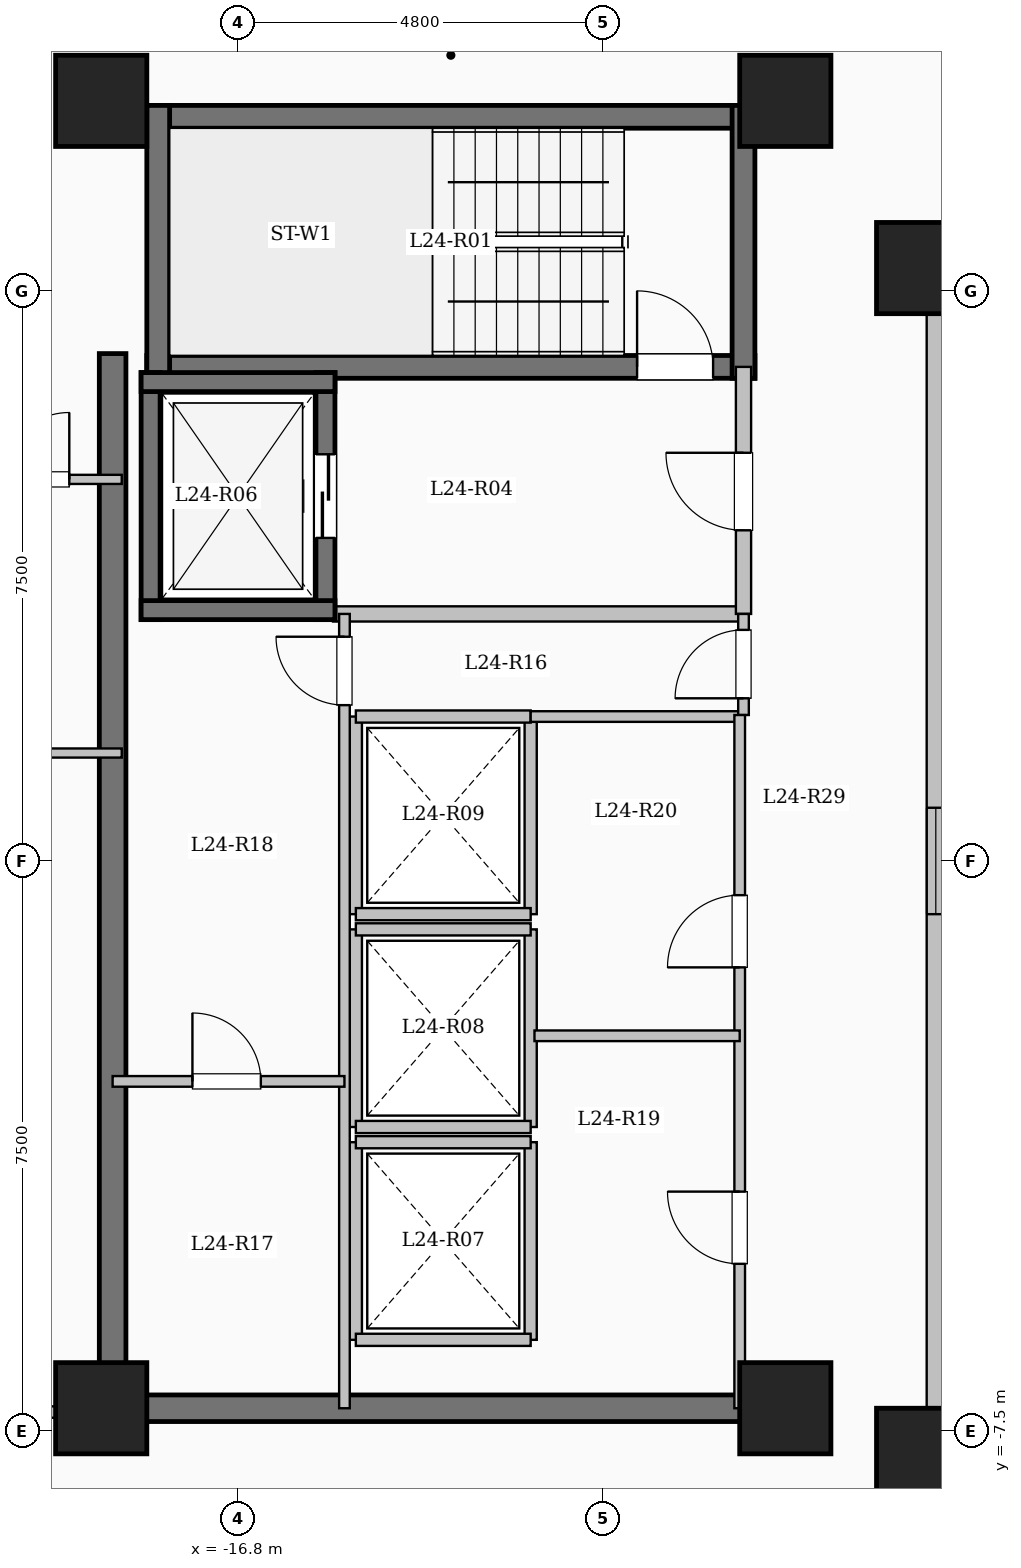
"""IFC4 building model, lengths in metres.
Left out: names, types, materials, properties, quantities, classifications, styles, units other than length and angle.
Written with IfcOpenShell. Run it as: python <this file> out.ifc"""

import sys

from ifc_helpers import new_model, si_unit, direction, frame, frame_2d, origin, origin_2d, place, context, subcontext, project, spatial, rectangle, extrude, element, fill, save


model = new_model("IFC4")
c1 = context("Model", 3, precision=1e-05, world=origin(), true_north=direction((0.0, 1.0)))
c2 = subcontext(c1, "Body", "Model", "MODEL_VIEW")
j1 = project(units=[si_unit("LENGTHUNIT", "METRE"), si_unit("PLANEANGLEUNIT", "RADIAN")], contexts=[c1])
p1 = place(None, origin())
s1 = spatial("IfcSite", under=j1, at=p1, CompositionType="ELEMENT")
p2 = place(p1, origin())
s2 = spatial("IfcBuilding", under=s1, at=p2, CompositionType="ELEMENT")
p3 = place(p2, frame((0.0, 0.0, 91.7)))
s3 = spatial("IfcBuildingStorey", under=s2, at=p3, CompositionType="ELEMENT", Elevation=91.7)
for number, where, z_axis, x_axis in (
    (1, (-7.8, -7.8, 0.0), (0.0, 0.0, 1.0), (1.0, 0.0, 0.0)),
    (2, (-7.8, 7.8, 0.0), (0.0, 0.0, 1.0), (1.0, 0.0, 0.0)),
    (3, (-9.6, -7.2, 0.0), (0.0, 0.0, 1.0), (1.0, 0.0, 0.0)),
    (4, (-9.6, 10.0, 0.0), (0.0, 0.0, 1.0), (1.0, 0.0, 0.0)),
    (5, (-18.6, -7.2, 0.0), (0.0, 0.0, 1.0), (1.0, 0.0, 0.0)),
    (6, (-18.6, 10.0, 0.0), (0.0, 0.0, 1.0), (1.0, 0.0, 0.0)),
):
    element("IfcColumn", number, at=place(p3, frame(where, z_axis=z_axis, x_axis=x_axis)), inside=s3, PredefinedType="COLUMN", context=c2, shape_type="SweptSolid", body=[
        extrude(rectangle(XDim=1.2, YDim=1.2, at=origin_2d()), origin(), (0.0, 0.0, 1.0), 3.35),
    ])
p4 = place(p3, frame((-7.62, -7.62, 0.0), z_axis=(0.0, 0.0, 1.0), x_axis=(1.0, 0.0, 0.0)))
e7 = element("IfcWall", 7, at=p4, inside=s3, PredefinedType="SOLIDWALL", context=c2, shape_type="SweptSolid", body=[
    extrude(rectangle(XDim=15.24, YDim=0.24, at=frame_2d((7.62, 0.0))), origin(), (0.0, 0.0, 1.0), 3.1),
])
p5 = place(p4, frame((6.92, 0.0, 0.95)))
e8 = element("IfcOpeningElement", 8, at=p5, cuts=e7, PredefinedType="OPENING", context=c2, shape_type="SweptSolid", body=[
    extrude(rectangle(XDim=1.4, YDim=1.5, at=frame_2d((0.7, 0.75))), frame((0.0, 0.13, 0.0), z_axis=(0.0, -1.0, 0.0), x_axis=(1.0, 0.0, 0.0)), (0.0, 0.0, 1.0), 0.26),
])
p6 = place(p3, frame((7.62, 7.62, 0.0), z_axis=(0.0, 0.0, 1.0), x_axis=(-1.0, 0.0, 0.0)))
e9 = element("IfcWall", 9, at=p6, inside=s3, PredefinedType="SOLIDWALL", context=c2, shape_type="SweptSolid", body=[
    extrude(rectangle(XDim=15.24, YDim=0.24, at=frame_2d((7.62, 0.0))), origin(), (0.0, 0.0, 1.0), 3.1),
])
p7 = place(p6, frame((6.92, 0.0, 0.95)))
e10 = element("IfcOpeningElement", 10, at=p7, cuts=e9, PredefinedType="OPENING", context=c2, shape_type="SweptSolid", body=[
    extrude(rectangle(XDim=1.4, YDim=1.5, at=frame_2d((0.7, 0.75))), frame((0.0, 0.13, 0.0), z_axis=(0.0, -1.0, 0.0), x_axis=(1.0, 0.0, 0.0)), (0.0, 0.0, 1.0), 0.26),
])
p8 = place(p3, frame((-7.62, 7.62, 0.0), z_axis=(0.0, 0.0, 1.0), x_axis=(0.0, -1.0, 0.0)))
e11 = element("IfcWall", 11, at=p8, inside=s3, PredefinedType="SOLIDWALL", context=c2, shape_type="SweptSolid", body=[
    extrude(rectangle(XDim=15.24, YDim=0.24, at=frame_2d((7.62, 0.0))), origin(), (0.0, 0.0, 1.0), 3.1),
])
p9 = place(p8, frame((6.92, 0.0, 0.95)))
e12 = element("IfcOpeningElement", 12, at=p9, cuts=e11, PredefinedType="OPENING", context=c2, shape_type="SweptSolid", body=[
    extrude(rectangle(XDim=1.4, YDim=1.5, at=frame_2d((0.7, 0.75))), frame((0.0, 0.13, 0.0), z_axis=(0.0, -1.0, 0.0), x_axis=(1.0, 0.0, 0.0)), (0.0, 0.0, 1.0), 0.26),
])
p10 = place(p3, frame((-18.0, 9.79, 0.0), z_axis=(0.0, 0.0, 1.0), x_axis=(1.0, 0.0, 0.0)))
e13 = element("IfcWall", 13, at=p10, inside=s3, PredefinedType="SHEAR", context=c2, shape_type="SweptSolid", body=[
    extrude(rectangle(XDim=8.0, YDim=0.3, at=frame_2d((4.0, 0.0))), origin(), (0.0, 0.0, 1.0), 3.35),
])
p11 = place(p3, frame((-18.0, 6.5, 0.0), z_axis=(0.0, 0.0, 1.0), x_axis=(1.0, 0.0, 0.0)))
e14 = element("IfcWall", 14, at=p11, inside=s3, PredefinedType="SHEAR", context=c2, shape_type="SweptSolid", body=[
    extrude(rectangle(XDim=8.0, YDim=0.3, at=frame_2d((4.0, 0.0))), origin(), (0.0, 0.0, 1.0), 3.35),
])
p12 = place(p11, frame((6.45, 0.0, 0.0)))
e15 = element("IfcOpeningElement", 15, at=p12, cuts=e14, PredefinedType="OPENING", context=c2, shape_type="SweptSolid", body=[
    extrude(rectangle(XDim=1.0, YDim=2.15, at=frame_2d((0.5, 1.075))), frame((0.0, 0.16, 0.0), z_axis=(0.0, -1.0, 0.0), x_axis=(1.0, 0.0, 0.0)), (0.0, 0.0, 1.0), 0.32),
])
for number, where, z_axis, x_axis in (
    (16, (-17.85, 6.35, 0.0), (0.0, 0.0, 1.0), (0.0, 1.0, 0.0)),
    (17, (-10.15, 6.35, 0.0), (0.0, 0.0, 1.0), (0.0, 1.0, 0.0)),
):
    element("IfcWall", number, at=place(p3, frame(where, z_axis=z_axis, x_axis=x_axis)), inside=s3, PredefinedType="SHEAR", context=c2, shape_type="SweptSolid", body=[
        extrude(rectangle(XDim=3.59, YDim=0.3, at=frame_2d((1.795, 0.0))), origin(), (0.0, 0.0, 1.0), 3.35),
    ])
p13 = place(p3, frame((-15.55, 3.25, 0.0), z_axis=(0.0, 0.0, 1.0), x_axis=(1.0, 0.0, 0.0)))
e18 = element("IfcWall", 18, at=p13, inside=s3, PredefinedType="SOLIDWALL", context=c2, shape_type="SweptSolid", body=[
    extrude(rectangle(XDim=5.4, YDim=0.2, at=frame_2d((2.7, 0.0))), origin(), (0.0, 0.0, 1.0), 3.1),
])
p14 = place(p3, frame((-10.15, 3.25, 0.0), z_axis=(0.0, 0.0, 1.0), x_axis=(0.0, 1.0, 0.0)))
e19 = element("IfcWall", 19, at=p14, inside=s3, PredefinedType="SOLIDWALL", context=c2, shape_type="SweptSolid", body=[
    extrude(rectangle(XDim=3.25, YDim=0.2, at=frame_2d((1.625, 0.0))), origin(), (0.0, 0.0, 1.0), 3.1),
])
p15 = place(p14, frame((1.1, 0.0, 0.0)))
e20 = element("IfcOpeningElement", 20, at=p15, cuts=e19, PredefinedType="OPENING", context=c2, shape_type="SweptSolid", body=[
    extrude(rectangle(XDim=1.02, YDim=2.15, at=frame_2d((0.51, 1.075))), frame((0.0, 0.11, 0.0), z_axis=(0.0, -1.0, 0.0), x_axis=(1.0, 0.0, 0.0)), (0.0, 0.0, 1.0), 0.22),
])
p16 = place(p3, frame((-17.95, 3.175, 0.0), z_axis=(0.0, 0.0, 1.0), x_axis=(0.0, 1.0, 0.0)))
e21 = element("IfcWall", 21, at=p16, inside=s3, PredefinedType="SHEAR", context=c2, shape_type="SweptSolid", body=[
    extrude(rectangle(XDim=3.25, YDim=0.25, at=frame_2d((1.625, 0.0))), origin(), (0.0, 0.0, 1.0), 3.35),
])
p17 = place(p3, frame((-15.65, 3.175, 0.0), z_axis=(0.0, 0.0, 1.0), x_axis=(0.0, 1.0, 0.0)))
e22 = element("IfcWall", 22, at=p17, inside=s3, PredefinedType="SHEAR", context=c2, shape_type="SweptSolid", body=[
    extrude(rectangle(XDim=3.25, YDim=0.25, at=frame_2d((1.625, 0.0))), origin(), (0.0, 0.0, 1.0), 3.35),
])
p18 = place(p17, frame((1.075, 0.0, 0.0)))
e23 = element("IfcOpeningElement", 23, at=p18, cuts=e22, PredefinedType="OPENING", context=c2, shape_type="SweptSolid", body=[
    extrude(rectangle(XDim=1.1, YDim=2.15, at=frame_2d((0.55, 1.075))), frame((0.0, 0.135, 0.0), z_axis=(0.0, -1.0, 0.0), x_axis=(1.0, 0.0, 0.0)), (0.0, 0.0, 1.0), 0.27),
])
for number, where, z_axis, x_axis in (
    (24, (-18.075, 3.3, 0.0), (0.0, 0.0, 1.0), (1.0, 0.0, 0.0)),
    (25, (-18.075, 6.3, 0.0), (0.0, 0.0, 1.0), (1.0, 0.0, 0.0)),
):
    element("IfcWall", number, at=place(p3, frame(where, z_axis=z_axis, x_axis=x_axis)), inside=s3, PredefinedType="SHEAR", context=c2, shape_type="SweptSolid", body=[
        extrude(rectangle(XDim=2.55, YDim=0.25, at=frame_2d((1.275, 0.0))), origin(), (0.0, 0.0, 1.0), 3.35),
    ])
for number, where, z_axis, x_axis in (
    (26, (-15.25, -6.3, 0.0), (0.0, 0.0, 1.0), (0.0, 1.0, 0.0)),
    (27, (-12.95, -6.3, 0.0), (0.0, 0.0, 1.0), (0.0, 1.0, 0.0)),
):
    element("IfcWall", number, at=place(p3, frame(where, z_axis=z_axis, x_axis=x_axis)), inside=s3, PredefinedType="SOLIDWALL", context=c2, shape_type="SweptSolid", body=[
        extrude(rectangle(XDim=2.6, YDim=0.16, at=frame_2d((1.3, 0.0))), origin(), (0.0, 0.0, 1.0), 3.1),
    ])
for number, where, z_axis, x_axis in (
    (28, (-15.25, -6.3, 0.0), (0.0, 0.0, 1.0), (1.0, 0.0, 0.0)),
    (29, (-15.25, -3.7, 0.0), (0.0, 0.0, 1.0), (1.0, 0.0, 0.0)),
):
    element("IfcWall", number, at=place(p3, frame(where, z_axis=z_axis, x_axis=x_axis)), inside=s3, PredefinedType="SOLIDWALL", context=c2, shape_type="SweptSolid", body=[
        extrude(rectangle(XDim=2.3, YDim=0.16, at=frame_2d((1.15, 0.0))), origin(), (0.0, 0.0, 1.0), 3.1),
    ])
for number, where, z_axis, x_axis in (
    (30, (-15.25, -3.5, 0.0), (0.0, 0.0, 1.0), (0.0, 1.0, 0.0)),
    (31, (-12.95, -3.5, 0.0), (0.0, 0.0, 1.0), (0.0, 1.0, 0.0)),
):
    element("IfcWall", number, at=place(p3, frame(where, z_axis=z_axis, x_axis=x_axis)), inside=s3, PredefinedType="SOLIDWALL", context=c2, shape_type="SweptSolid", body=[
        extrude(rectangle(XDim=2.6, YDim=0.16, at=frame_2d((1.3, 0.0))), origin(), (0.0, 0.0, 1.0), 3.1),
    ])
for number, where, z_axis, x_axis in (
    (32, (-15.25, -3.5, 0.0), (0.0, 0.0, 1.0), (1.0, 0.0, 0.0)),
    (33, (-15.25, -0.9, 0.0), (0.0, 0.0, 1.0), (1.0, 0.0, 0.0)),
):
    element("IfcWall", number, at=place(p3, frame(where, z_axis=z_axis, x_axis=x_axis)), inside=s3, PredefinedType="SOLIDWALL", context=c2, shape_type="SweptSolid", body=[
        extrude(rectangle(XDim=2.3, YDim=0.16, at=frame_2d((1.15, 0.0))), origin(), (0.0, 0.0, 1.0), 3.1),
    ])
for number, where, z_axis, x_axis in (
    (34, (-15.25, -0.7, 0.0), (0.0, 0.0, 1.0), (0.0, 1.0, 0.0)),
    (35, (-12.95, -0.7, 0.0), (0.0, 0.0, 1.0), (0.0, 1.0, 0.0)),
):
    element("IfcWall", number, at=place(p3, frame(where, z_axis=z_axis, x_axis=x_axis)), inside=s3, PredefinedType="SOLIDWALL", context=c2, shape_type="SweptSolid", body=[
        extrude(rectangle(XDim=2.6, YDim=0.16, at=frame_2d((1.3, 0.0))), origin(), (0.0, 0.0, 1.0), 3.1),
    ])
for number, where, z_axis, x_axis in (
    (36, (-15.25, -0.7, 0.0), (0.0, 0.0, 1.0), (1.0, 0.0, 0.0)),
    (37, (-15.25, 1.9, 0.0), (0.0, 0.0, 1.0), (1.0, 0.0, 0.0)),
):
    element("IfcWall", number, at=place(p3, frame(where, z_axis=z_axis, x_axis=x_axis)), inside=s3, PredefinedType="SOLIDWALL", context=c2, shape_type="SweptSolid", body=[
        extrude(rectangle(XDim=2.3, YDim=0.16, at=frame_2d((1.15, 0.0))), origin(), (0.0, 0.0, 1.0), 3.1),
    ])
p19 = place(p3, frame((-18.45, -7.375, 0.0), z_axis=(0.0, 0.0, 1.0), x_axis=(0.0, 1.0, 0.0)))
e38 = element("IfcWall", 38, at=p19, inside=s3, PredefinedType="SHEAR", context=c2, shape_type="SweptSolid", body=[
    extrude(rectangle(XDim=14.05, YDim=0.35, at=frame_2d((7.025, 0.0))), origin(), (0.0, 0.0, 1.0), 3.35),
])
p20 = place(p3, frame((-18.625, -7.2, 0.0), z_axis=(0.0, 0.0, 1.0), x_axis=(1.0, 0.0, 0.0)))
e39 = element("IfcWall", 39, at=p20, inside=s3, PredefinedType="SHEAR", context=c2, shape_type="SweptSolid", body=[
    extrude(rectangle(XDim=8.55, YDim=0.35, at=frame_2d((4.275, 0.0))), origin(), (0.0, 0.0, 1.0), 3.35),
])
p21 = place(p3, frame((-12.95, 1.9, 0.0), z_axis=(0.0, 0.0, 1.0), x_axis=(1.0, 0.0, 0.0)))
e40 = element("IfcWall", 40, at=p21, inside=s3, PredefinedType="PARTITIONING", context=c2, shape_type="SweptSolid", body=[
    extrude(rectangle(XDim=2.8, YDim=0.14, at=frame_2d((1.4, 0.0))), origin(), (0.0, 0.0, 1.0), 3.1),
])
p22 = place(p3, frame((-10.15, 1.92, 0.0), z_axis=(0.0, 0.0, 1.0), x_axis=(0.0, 1.0, 0.0)))
e41 = element("IfcWall", 41, at=p22, inside=s3, PredefinedType="PARTITIONING", context=c2, shape_type="SweptSolid", body=[
    extrude(rectangle(XDim=1.33, YDim=0.14, at=frame_2d((0.665, 0.0))), origin(), (0.0, 0.0, 1.0), 3.1),
])
p23 = place(p22, frame((0.22, 0.0, 0.0)))
e42 = element("IfcOpeningElement", 42, at=p23, cuts=e41, PredefinedType="OPENING", context=c2, shape_type="SweptSolid", body=[
    extrude(rectangle(XDim=0.9, YDim=2.08, at=frame_2d((0.45, 1.04))), frame((0.0, 0.08, 0.0), z_axis=(0.0, -1.0, 0.0), x_axis=(1.0, 0.0, 0.0)), (0.0, 0.0, 1.0), 0.16),
])
p24 = place(p3, frame((-15.4, -7.2, 0.0), z_axis=(0.0, 0.0, 1.0), x_axis=(0.0, 1.0, 0.0)))
e43 = element("IfcWall", 43, at=p24, inside=s3, PredefinedType="PARTITIONING", context=c2, shape_type="SweptSolid", body=[
    extrude(rectangle(XDim=10.45, YDim=0.14, at=frame_2d((5.225, 0.0))), origin(), (0.0, 0.0, 1.0), 3.1),
])
p25 = place(p24, frame((9.25, 0.0, 0.0)))
e44 = element("IfcOpeningElement", 44, at=p25, cuts=e43, PredefinedType="OPENING", context=c2, shape_type="SweptSolid", body=[
    extrude(rectangle(XDim=0.9, YDim=2.08, at=frame_2d((0.45, 1.04))), frame((0.0, 0.08, 0.0), z_axis=(0.0, -1.0, 0.0), x_axis=(1.0, 0.0, 0.0)), (0.0, 0.0, 1.0), 0.16),
])
p26 = place(p3, frame((-18.45, -2.9, 0.0), z_axis=(0.0, 0.0, 1.0), x_axis=(1.0, 0.0, 0.0)))
e45 = element("IfcWall", 45, at=p26, inside=s3, PredefinedType="PARTITIONING", context=c2, shape_type="SweptSolid", body=[
    extrude(rectangle(XDim=3.05, YDim=0.14, at=frame_2d((1.525, 0.0))), origin(), (0.0, 0.0, 1.0), 3.1),
])
p27 = place(p26, frame((1.05, 0.0, 0.0)))
e46 = element("IfcOpeningElement", 46, at=p27, cuts=e45, PredefinedType="OPENING", context=c2, shape_type="SweptSolid", body=[
    extrude(rectangle(XDim=0.9, YDim=2.08, at=frame_2d((0.45, 1.04))), frame((0.0, 0.08, 0.0), z_axis=(0.0, -1.0, 0.0), x_axis=(1.0, 0.0, 0.0)), (0.0, 0.0, 1.0), 0.16),
])
p28 = place(p3, frame((-10.2, -7.2, 0.0), z_axis=(0.0, 0.0, 1.0), x_axis=(0.0, 1.0, 0.0)))
e47 = element("IfcWall", 47, at=p28, inside=s3, PredefinedType="PARTITIONING", context=c2, shape_type="SweptSolid", body=[
    extrude(rectangle(XDim=9.12, YDim=0.14, at=frame_2d((4.56, 0.0))), origin(), (0.0, 0.0, 1.0), 3.1),
])
p29 = place(p28, frame((1.9, 0.0, 0.0)))
e48 = element("IfcOpeningElement", 48, at=p29, cuts=e47, PredefinedType="OPENING", context=c2, shape_type="SweptSolid", body=[
    extrude(rectangle(XDim=0.95, YDim=2.12, at=frame_2d((0.475, 1.06))), frame((0.0, 0.08, 0.0), z_axis=(0.0, -1.0, 0.0), x_axis=(1.0, 0.0, 0.0)), (0.0, 0.0, 1.0), 0.16),
])
p30 = place(p28, frame((5.8, 0.0, 0.0)))
e49 = element("IfcOpeningElement", 49, at=p30, cuts=e47, PredefinedType="OPENING", context=c2, shape_type="SweptSolid", body=[
    extrude(rectangle(XDim=0.95, YDim=2.12, at=frame_2d((0.475, 1.06))), frame((0.0, 0.08, 0.0), z_axis=(0.0, -1.0, 0.0), x_axis=(1.0, 0.0, 0.0)), (0.0, 0.0, 1.0), 0.16),
])
p31 = place(p3, frame((-12.9, -2.3, 0.0), z_axis=(0.0, 0.0, 1.0), x_axis=(1.0, 0.0, 0.0)))
e50 = element("IfcWall", 50, at=p31, inside=s3, PredefinedType="PARTITIONING", context=c2, shape_type="SweptSolid", body=[
    extrude(rectangle(XDim=2.7, YDim=0.14, at=frame_2d((1.35, 0.0))), origin(), (0.0, 0.0, 1.0), 3.1),
])
p32 = place(p3, frame((-26.88, -7.25, 0.0), z_axis=(0.0, 0.0, 1.0), x_axis=(1.0, 0.0, 0.0)))
e51 = element("IfcWall", 51, at=p32, inside=s3, PredefinedType="PARTITIONING", context=c2, shape_type="SweptSolid", body=[
    extrude(rectangle(XDim=8.43, YDim=0.15, at=frame_2d((4.215, 0.0))), origin(), (0.0, 0.0, 1.0), 3.1),
])
p33 = place(p32, frame((5.33, 0.0, 0.0)))
e52 = element("IfcOpeningElement", 52, at=p33, cuts=e51, PredefinedType="OPENING", context=c2, shape_type="SweptSolid", body=[
    extrude(rectangle(XDim=0.96, YDim=2.15, at=frame_2d((0.48, 1.075))), frame((0.0, 0.085, 0.0), z_axis=(0.0, -1.0, 0.0), x_axis=(1.0, 0.0, 0.0)), (0.0, 0.0, 1.0), 0.17),
])
p34 = place(p3, frame((-27.0, 1.42, 0.0), z_axis=(0.0, 0.0, 1.0), x_axis=(1.0, 0.0, 0.0)))
e53 = element("IfcWall", 53, at=p34, inside=s3, PredefinedType="PARTITIONING", context=c2, shape_type="SweptSolid", body=[
    extrude(rectangle(XDim=8.67, YDim=0.12, at=frame_2d((4.335, 0.0))), origin(), (0.0, 0.0, 1.0), 3.1),
])
p35 = place(p34, frame((1.763, 0.0, 0.0)))
e54 = element("IfcOpeningElement", 54, at=p35, cuts=e53, PredefinedType="OPENING", context=c2, shape_type="SweptSolid", body=[
    extrude(rectangle(XDim=0.88, YDim=2.1, at=frame_2d((0.44, 1.05))), frame((0.0, 0.07, 0.0), z_axis=(0.0, -1.0, 0.0), x_axis=(1.0, 0.0, 0.0)), (0.0, 0.0, 1.0), 0.14),
])
p36 = place(p34, frame((5.928, 0.0, 0.0)))
e55 = element("IfcOpeningElement", 55, at=p36, cuts=e53, PredefinedType="OPENING", context=c2, shape_type="SweptSolid", body=[
    extrude(rectangle(XDim=0.88, YDim=2.1, at=frame_2d((0.44, 1.05))), frame((0.0, 0.07, 0.0), z_axis=(0.0, -1.0, 0.0), x_axis=(1.0, 0.0, 0.0)), (0.0, 0.0, 1.0), 0.14),
])
p37 = place(p3, frame((-27.0, 5.02, 0.0), z_axis=(0.0, 0.0, 1.0), x_axis=(1.0, 0.0, 0.0)))
e56 = element("IfcWall", 56, at=p37, inside=s3, PredefinedType="PARTITIONING", context=c2, shape_type="SweptSolid", body=[
    extrude(rectangle(XDim=8.67, YDim=0.12, at=frame_2d((4.335, 0.0))), origin(), (0.0, 0.0, 1.0), 3.1),
])
p38 = place(p37, frame((7.1, 0.0, 0.0)))
e57 = element("IfcOpeningElement", 57, at=p38, cuts=e56, PredefinedType="OPENING", context=c2, shape_type="SweptSolid", body=[
    extrude(rectangle(XDim=0.88, YDim=2.1, at=frame_2d((0.44, 1.05))), frame((0.0, 0.07, 0.0), z_axis=(0.0, -1.0, 0.0), x_axis=(1.0, 0.0, 0.0)), (0.0, 0.0, 1.0), 0.14),
])
p39 = place(p9, origin())
e58 = element("IfcWindow", 58, at=p39, inside=s3, PartitioningType="SINGLE_PANEL", PredefinedType="WINDOW", context=c2, shape_type="SweptSolid", body=[
    extrude(rectangle(XDim=1.4, YDim=1.5, at=frame_2d((0.7, 0.75))), frame((0.0, 0.03, 0.0), z_axis=(0.0, -1.0, 0.0), x_axis=(1.0, 0.0, 0.0)), (0.0, 0.0, 1.0), 0.06),
])
fill(e12, e58)
p40 = place(p12, origin())
e59 = element("IfcDoor", 59, at=p40, inside=s3, OperationType="SINGLE_SWING_LEFT", PredefinedType="DOOR", context=c2, shape_type="SweptSolid", body=[
    extrude(rectangle(XDim=1.0, YDim=2.15, at=frame_2d((0.5, 1.075))), frame((0.0, 0.025, 0.0), z_axis=(0.0, -1.0, 0.0), x_axis=(1.0, 0.0, 0.0)), (0.0, 0.0, 1.0), 0.05),
])
fill(e15, e59)
p41 = place(p15, origin())
e60 = element("IfcDoor", 60, at=p41, inside=s3, OperationType="SINGLE_SWING_RIGHT", PredefinedType="DOOR", context=c2, shape_type="SweptSolid", body=[
    extrude(rectangle(XDim=1.02, YDim=2.15, at=frame_2d((0.51, 1.075))), frame((0.0, 0.025, 0.0), z_axis=(0.0, -1.0, 0.0), x_axis=(1.0, 0.0, 0.0)), (0.0, 0.0, 1.0), 0.05),
])
fill(e20, e60)
p42 = place(p18, origin())
e61 = element("IfcDoor", 61, at=p42, inside=s3, OperationType="SLIDING_TO_LEFT", PredefinedType="DOOR", context=c2, shape_type="SweptSolid", body=[
    extrude(rectangle(XDim=1.1, YDim=2.15, at=frame_2d((0.55, 1.075))), frame((0.0, 0.025, 0.0), z_axis=(0.0, -1.0, 0.0), x_axis=(1.0, 0.0, 0.0)), (0.0, 0.0, 1.0), 0.05),
])
fill(e23, e61)
p43 = place(p23, origin())
e62 = element("IfcDoor", 62, at=p43, inside=s3, OperationType="SINGLE_SWING_LEFT", PredefinedType="DOOR", context=c2, shape_type="SweptSolid", body=[
    extrude(rectangle(XDim=0.9, YDim=2.08, at=frame_2d((0.45, 1.04))), frame((0.0, 0.025, 0.0), z_axis=(0.0, -1.0, 0.0), x_axis=(1.0, 0.0, 0.0)), (0.0, 0.0, 1.0), 0.05),
])
fill(e42, e62)
p44 = place(p25, origin())
e63 = element("IfcDoor", 63, at=p44, inside=s3, OperationType="SINGLE_SWING_RIGHT", PredefinedType="DOOR", context=c2, shape_type="SweptSolid", body=[
    extrude(rectangle(XDim=0.9, YDim=2.08, at=frame_2d((0.45, 1.04))), frame((0.0, 0.025, 0.0), z_axis=(0.0, -1.0, 0.0), x_axis=(1.0, 0.0, 0.0)), (0.0, 0.0, 1.0), 0.05),
])
fill(e44, e63)
p45 = place(p27, origin())
e64 = element("IfcDoor", 64, at=p45, inside=s3, OperationType="SINGLE_SWING_LEFT", PredefinedType="DOOR", context=c2, shape_type="SweptSolid", body=[
    extrude(rectangle(XDim=0.9, YDim=2.08, at=frame_2d((0.45, 1.04))), frame((0.0, 0.025, 0.0), z_axis=(0.0, -1.0, 0.0), x_axis=(1.0, 0.0, 0.0)), (0.0, 0.0, 1.0), 0.05),
])
fill(e46, e64)
p46 = place(p29, origin())
e65 = element("IfcDoor", 65, at=p46, inside=s3, OperationType="SINGLE_SWING_RIGHT", PredefinedType="DOOR", context=c2, shape_type="SweptSolid", body=[
    extrude(rectangle(XDim=0.95, YDim=2.12, at=frame_2d((0.475, 1.06))), frame((0.0, 0.025, 0.0), z_axis=(0.0, -1.0, 0.0), x_axis=(1.0, 0.0, 0.0)), (0.0, 0.0, 1.0), 0.05),
])
fill(e48, e65)
p47 = place(p30, origin())
e66 = element("IfcDoor", 66, at=p47, inside=s3, OperationType="SINGLE_SWING_LEFT", PredefinedType="DOOR", context=c2, shape_type="SweptSolid", body=[
    extrude(rectangle(XDim=0.95, YDim=2.12, at=frame_2d((0.475, 1.06))), frame((0.0, 0.025, 0.0), z_axis=(0.0, -1.0, 0.0), x_axis=(1.0, 0.0, 0.0)), (0.0, 0.0, 1.0), 0.05),
])
fill(e49, e66)
p48 = place(p38, origin())
e67 = element("IfcDoor", 67, at=p48, inside=s3, OperationType="SINGLE_SWING_RIGHT", PredefinedType="DOOR", context=c2, shape_type="SweptSolid", body=[
    extrude(rectangle(XDim=0.88, YDim=2.1, at=frame_2d((0.44, 1.05))), frame((0.0, 0.025, 0.0), z_axis=(0.0, -1.0, 0.0), x_axis=(1.0, 0.0, 0.0)), (0.0, 0.0, 1.0), 0.05),
])
fill(e57, e67)
save(model, sys.argv[1])
